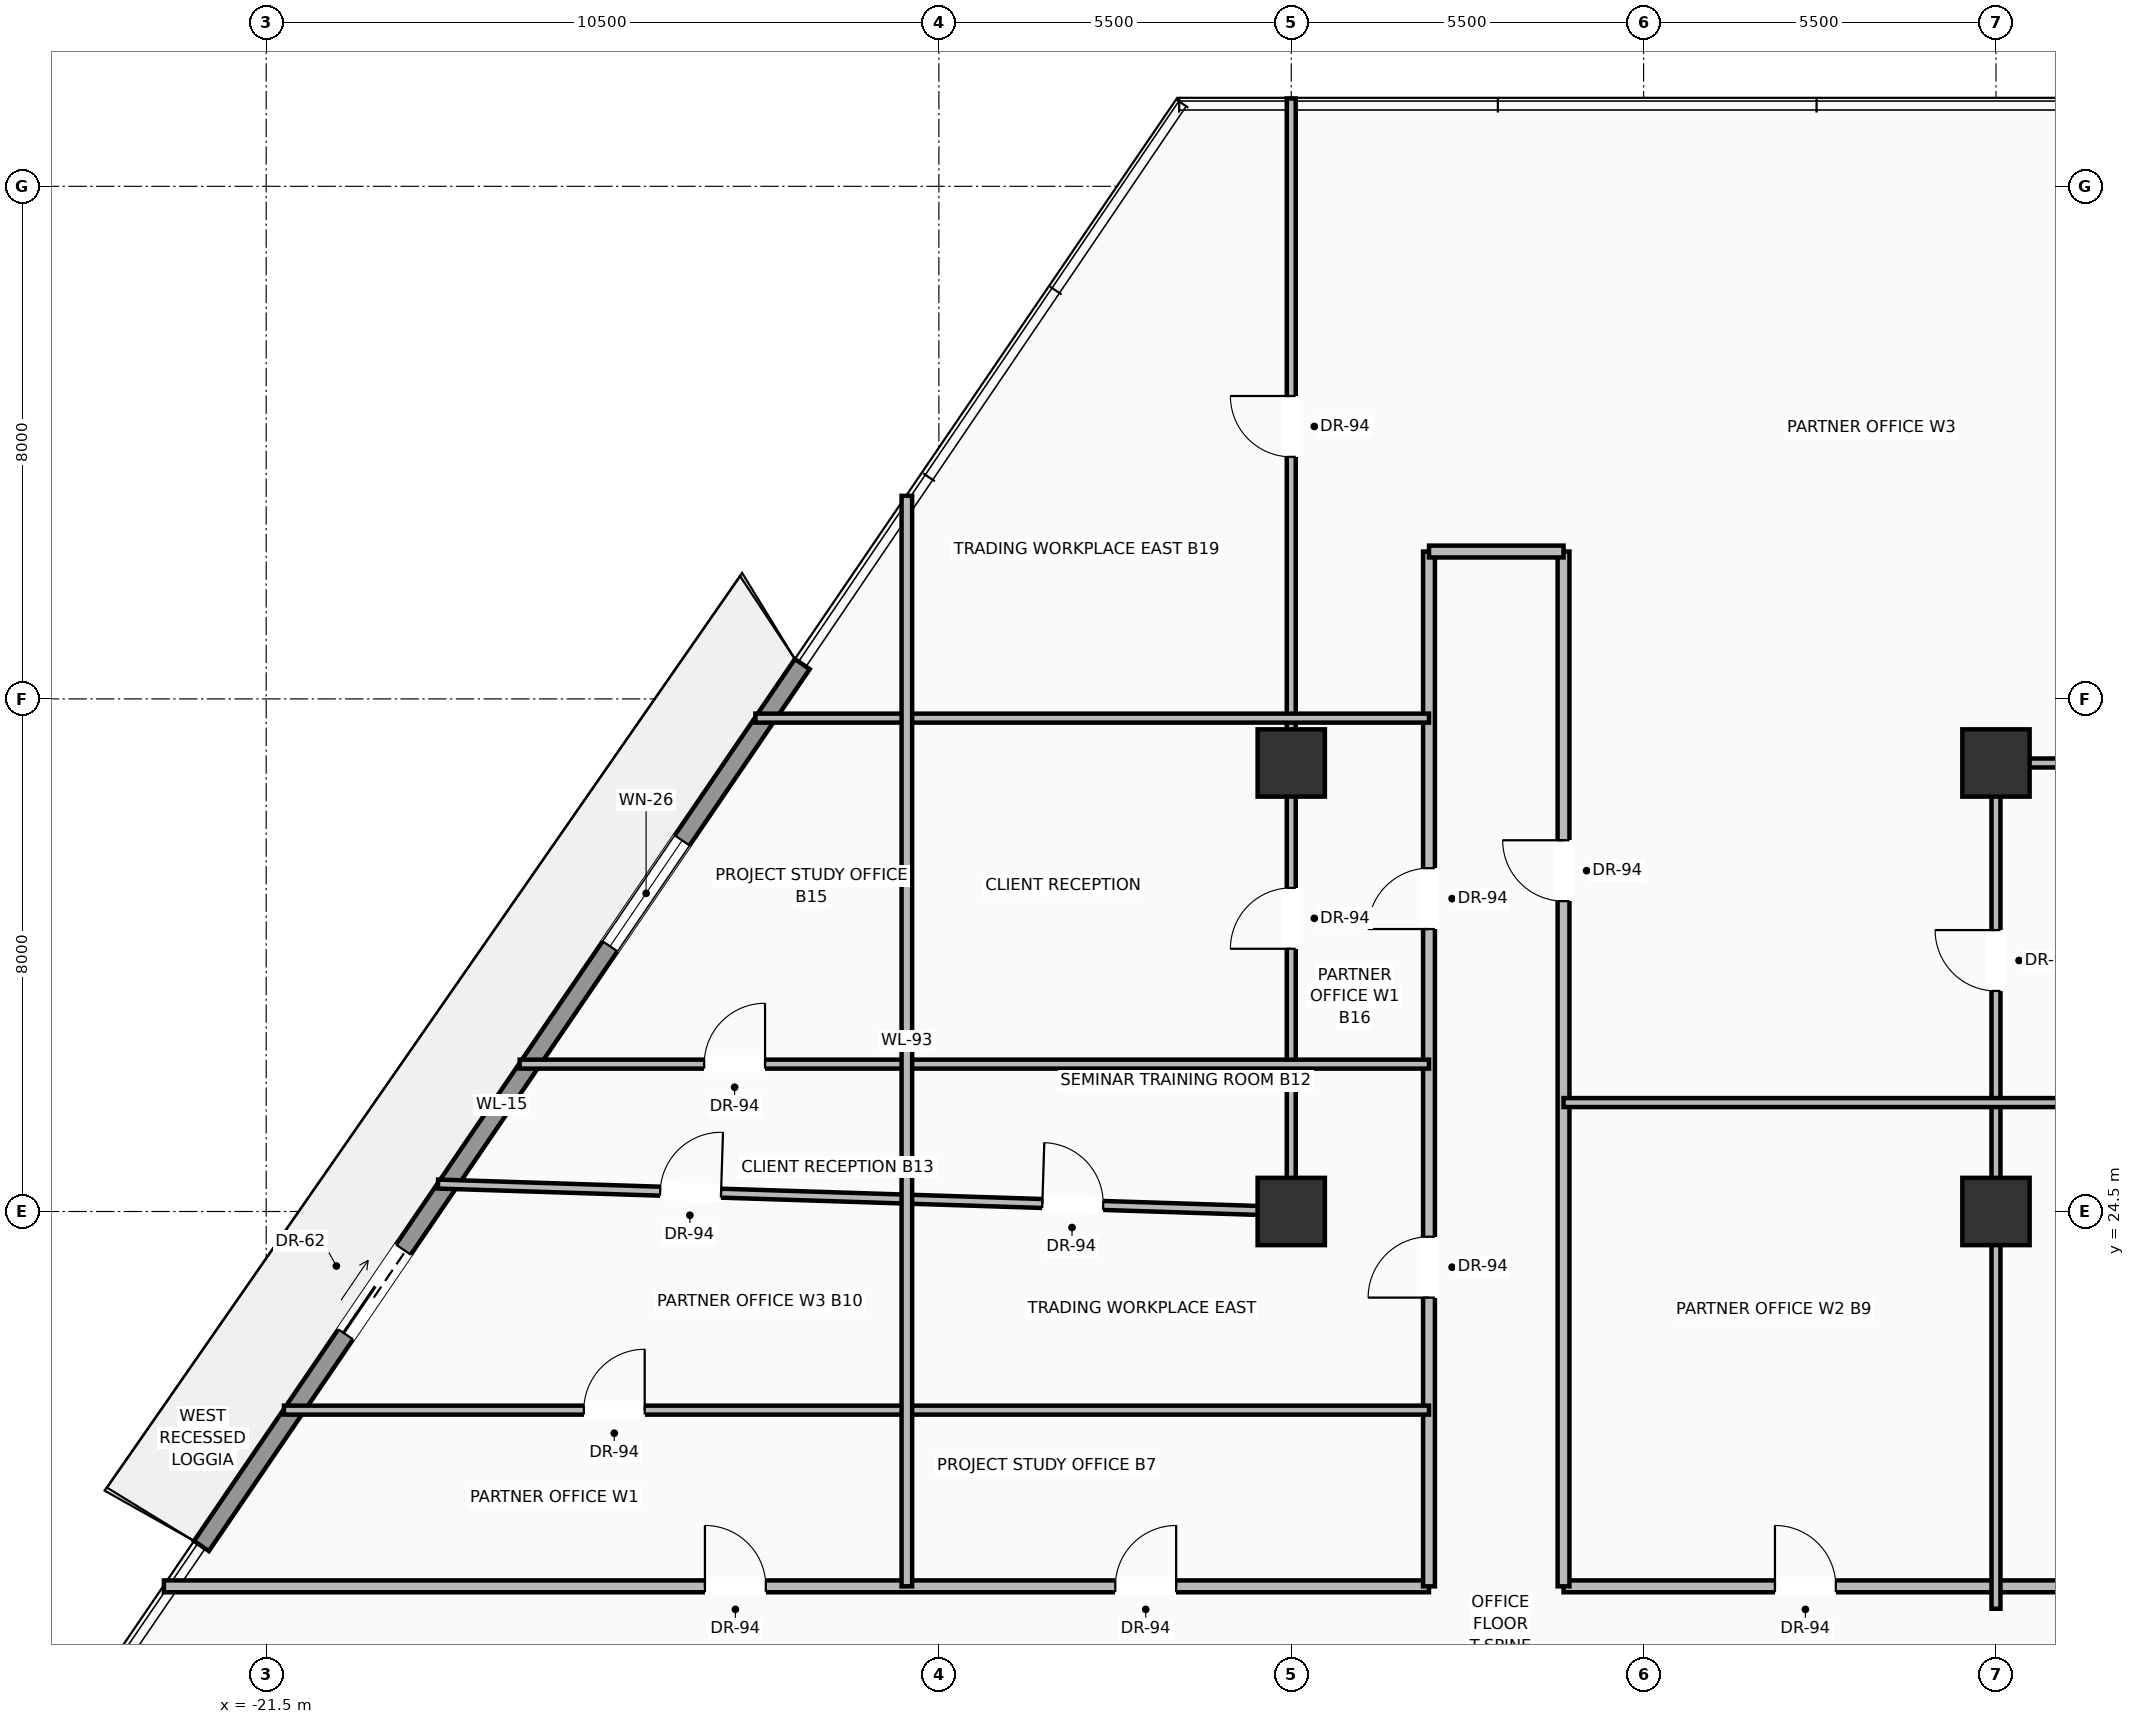
"""IFC4 building model, lengths in metres.
Left out: names, types, materials, properties, quantities, classifications, styles, units other than length and angle.
Written with IfcOpenShell. Run it as: python <this file> out.ifc"""

import sys

from ifc_helpers import new_model, si_unit, direction, frame, frame_2d, origin, origin_2d, place, context, subcontext, project, spatial, rectangle, extrude, source, transform, mapped, element, fill, save


model = new_model("IFC4")
c1 = context("Model", 3, precision=1e-05, world=origin(), true_north=direction((0.0, 1.0)))
c2 = subcontext(c1, "Body", "Model", "MODEL_VIEW")
j1 = project(units=[si_unit("LENGTHUNIT", "METRE"), si_unit("PLANEANGLEUNIT", "RADIAN")], contexts=[c1])
p1 = place(None, origin())
s1 = spatial("IfcSite", under=j1, at=p1, CompositionType="ELEMENT")
p2 = place(p1, origin())
s2 = spatial("IfcBuilding", under=s1, at=p2, CompositionType="ELEMENT")
p3 = place(p2, frame((0.0, 0.0, 46.0)))
s3 = spatial("IfcBuildingStorey", under=s2, at=p3, CompositionType="ELEMENT", Elevation=46.0)
m1 = source(origin(), c2, "Body", "SweptSolid", [
    extrude(rectangle(XDim=1.05, YDim=1.05, at=origin_2d()), origin(), (0.0, 0.0, 1.0), 3.7),
])
for number, where, z_axis, x_axis in (
    (1, (-5.5, 24.5, 0.0), (0.0, 0.0, 1.0), (1.0, 0.0, 0.0)),
    (2, (5.5, 24.5, 0.0), (0.0, 0.0, 1.0), (1.0, 0.0, 0.0)),
    (3, (-5.5, 31.5, 0.0), (0.0, 0.0, 1.0), (1.0, 0.0, 0.0)),
    (4, (5.5, 31.5, 0.0), (0.0, 0.0, 1.0), (1.0, 0.0, 0.0)),
):
    element("IfcColumn", number, at=place(p3, frame(where, z_axis=z_axis, x_axis=x_axis)), inside=s3, PredefinedType="COLUMN", context=c2, shape_type="MappedRepresentation", body=[
        mapped(m1, transform((0.0, 0.0, 0.0), scale=1.0)),
    ])
p4 = place(p3, frame((-22.51, 19.279, 0.0), z_axis=(0.0, 0.0, 1.0), x_axis=(0.563087999023, 0.826396941764, 0.0)))
e5 = element("IfcWall", 5, at=p4, inside=s3, PredefinedType="SOLIDWALL", context=c2, shape_type="SweptSolid", body=[
    extrude(rectangle(XDim=16.655, YDim=0.28, at=frame_2d((8.328, 0.0))), origin(), (0.0, 0.0, 1.0), 3.03),
])
p5 = place(p4, frame((3.997, 0.0, 0.0)))
e6 = element("IfcOpeningElement", 6, at=p5, cuts=e5, PredefinedType="OPENING", context=c2, shape_type="SweptSolid", body=[
    extrude(rectangle(XDim=1.6, YDim=2.35, at=frame_2d((0.8, 1.175))), frame((0.0, 0.15, 0.0), z_axis=(0.0, -1.0, 0.0), x_axis=(1.0, 0.0, 0.0)), (0.0, 0.0, 1.0), 0.3),
])
p6 = place(p4, frame((11.326, 0.0, 0.9)))
e7 = element("IfcOpeningElement", 7, at=p6, cuts=e5, PredefinedType="OPENING", context=c2, shape_type="SweptSolid", body=[
    extrude(rectangle(XDim=2.0, YDim=1.85, at=frame_2d((1.0, 0.925))), frame((0.0, 0.15, 0.0), z_axis=(0.0, -1.0, 0.0), x_axis=(1.0, 0.0, 0.0)), (0.0, 0.0, 1.0), 0.3),
])
p7 = place(p3, frame((-23.096, 18.65, 0.0), z_axis=(0.0, 0.0, 1.0), x_axis=(1.0, 0.0, 0.0)))
e8 = element("IfcWall", 8, at=p7, inside=s3, PredefinedType="PARTITIONING", context=c2, shape_type="SweptSolid", body=[
    extrude(rectangle(XDim=19.746, YDim=0.185, at=frame_2d((9.873, 0.0))), origin(), (0.0, 0.0, 1.0), 2.747),
])
p8 = place(p7, frame((8.445, 0.0, 0.0)))
e9 = element("IfcOpeningElement", 9, at=p8, cuts=e8, PredefinedType="OPENING", context=c2, shape_type="SweptSolid", body=[
    extrude(rectangle(XDim=0.95, YDim=2.2, at=frame_2d((0.475, 1.1))), frame((0.0, 0.103, 0.0), z_axis=(0.0, -1.0, 0.0), x_axis=(1.0, 0.0, 0.0)), (0.0, 0.0, 1.0), 0.205),
])
p9 = place(p7, frame((14.85, 0.0, 0.0)))
e10 = element("IfcOpeningElement", 10, at=p9, cuts=e8, PredefinedType="OPENING", context=c2, shape_type="SweptSolid", body=[
    extrude(rectangle(XDim=0.95, YDim=2.2, at=frame_2d((0.475, 1.1))), frame((0.0, 0.103, 0.0), z_axis=(0.0, -1.0, 0.0), x_axis=(1.0, 0.0, 0.0)), (0.0, 0.0, 1.0), 0.205),
])
p10 = place(p3, frame((-1.25, 18.65, 0.0), z_axis=(0.0, 0.0, 1.0), x_axis=(1.0, 0.0, 0.0)))
e11 = element("IfcWall", 11, at=p10, inside=s3, PredefinedType="PARTITIONING", context=c2, shape_type="SweptSolid", body=[
    extrude(rectangle(XDim=24.535, YDim=0.185, at=frame_2d((12.268, 0.0))), origin(), (0.0, 0.0, 1.0), 2.747),
])
p11 = place(p10, frame((12.986, 0.0, 0.0)))
e12 = element("IfcOpeningElement", 12, at=p11, cuts=e11, PredefinedType="OPENING", context=c2, shape_type="SweptSolid", body=[
    extrude(rectangle(XDim=0.95, YDim=2.2, at=frame_2d((0.475, 1.1))), frame((0.0, 0.103, 0.0), z_axis=(0.0, -1.0, 0.0), x_axis=(1.0, 0.0, 0.0)), (0.0, 0.0, 1.0), 0.205),
])
p12 = place(p10, frame((3.3, 0.0, 0.0)))
e13 = element("IfcOpeningElement", 13, at=p12, cuts=e11, PredefinedType="OPENING", context=c2, shape_type="SweptSolid", body=[
    extrude(rectangle(XDim=0.95, YDim=2.2, at=frame_2d((0.475, 1.1))), frame((0.0, 0.103, 0.0), z_axis=(0.0, -1.0, 0.0), x_axis=(1.0, 0.0, 0.0)), (0.0, 0.0, 1.0), 0.205),
])
p13 = place(p3, frame((-3.35, 18.65, 0.0), z_axis=(0.0, 0.0, 1.0), x_axis=(0.0, 1.0, 0.0)))
e14 = element("IfcWall", 14, at=p13, inside=s3, PredefinedType="PARTITIONING", context=c2, shape_type="SweptSolid", body=[
    extrude(rectangle(XDim=16.15, YDim=0.185, at=frame_2d((8.075, 0.0))), origin(), (0.0, 0.0, 1.0), 2.747),
])
p14 = place(p13, frame((4.506, 0.0, 0.0)))
e15 = element("IfcOpeningElement", 15, at=p14, cuts=e14, PredefinedType="OPENING", context=c2, shape_type="SweptSolid", body=[
    extrude(rectangle(XDim=0.95, YDim=2.2, at=frame_2d((0.475, 1.1))), frame((0.0, 0.103, 0.0), z_axis=(0.0, -1.0, 0.0), x_axis=(1.0, 0.0, 0.0)), (0.0, 0.0, 1.0), 0.205),
])
p15 = place(p13, frame((10.258, 0.0, 0.0)))
e16 = element("IfcOpeningElement", 16, at=p15, cuts=e14, PredefinedType="OPENING", context=c2, shape_type="SweptSolid", body=[
    extrude(rectangle(XDim=0.95, YDim=2.2, at=frame_2d((0.475, 1.1))), frame((0.0, 0.103, 0.0), z_axis=(0.0, -1.0, 0.0), x_axis=(1.0, 0.0, 0.0)), (0.0, 0.0, 1.0), 0.205),
])
p16 = place(p3, frame((-1.25, 18.65, 0.0), z_axis=(0.0, 0.0, 1.0), x_axis=(0.0, 1.0, 0.0)))
e17 = element("IfcWall", 17, at=p16, inside=s3, PredefinedType="PARTITIONING", context=c2, shape_type="SweptSolid", body=[
    extrude(rectangle(XDim=16.15, YDim=0.185, at=frame_2d((8.075, 0.0))), origin(), (0.0, 0.0, 1.0), 2.747),
])
p17 = place(p16, frame((10.694, 0.0, 0.0)))
e18 = element("IfcOpeningElement", 18, at=p17, cuts=e17, PredefinedType="OPENING", context=c2, shape_type="SweptSolid", body=[
    extrude(rectangle(XDim=0.95, YDim=2.2, at=frame_2d((0.475, 1.1))), frame((0.0, 0.103, 0.0), z_axis=(0.0, -1.0, 0.0), x_axis=(1.0, 0.0, 0.0)), (0.0, 0.0, 1.0), 0.205),
])
p18 = place(p3, frame((-3.35, 34.8, 0.0), z_axis=(0.0, 0.0, 1.0), x_axis=(1.0, 0.0, 0.0)))
e19 = element("IfcWall", 19, at=p18, inside=s3, PredefinedType="PARTITIONING", context=c2, shape_type="SweptSolid", body=[
    extrude(rectangle(XDim=2.1, YDim=0.185, at=frame_2d((1.05, 0.0))), origin(), (0.0, 0.0, 1.0), 2.979),
])
p19 = place(p3, frame((-5.5, 24.5, 0.0), z_axis=(0.0, 0.0, 1.0), x_axis=(0.0, 1.0, 0.0)))
e20 = element("IfcWall", 20, at=p19, inside=s3, PredefinedType="PARTITIONING", context=c2, shape_type="SweptSolid", body=[
    extrude(rectangle(XDim=17.371, YDim=0.14, at=frame_2d((8.686, 0.0))), origin(), (0.0, 0.0, 1.0), 2.747),
])
p20 = place(p19, frame((11.777, 0.0, 0.0)))
e21 = element("IfcOpeningElement", 21, at=p20, cuts=e20, PredefinedType="OPENING", context=c2, shape_type="SweptSolid", body=[
    extrude(rectangle(XDim=0.95, YDim=2.2, at=frame_2d((0.475, 1.1))), frame((0.0, 0.08, 0.0), z_axis=(0.0, -1.0, 0.0), x_axis=(1.0, 0.0, 0.0)), (0.0, 0.0, 1.0), 0.16),
])
p21 = place(p19, frame((4.1, 0.0, 0.0)))
e22 = element("IfcOpeningElement", 22, at=p21, cuts=e20, PredefinedType="OPENING", context=c2, shape_type="SweptSolid", body=[
    extrude(rectangle(XDim=0.95, YDim=2.2, at=frame_2d((0.475, 1.1))), frame((0.0, 0.08, 0.0), z_axis=(0.0, -1.0, 0.0), x_axis=(1.0, 0.0, 0.0)), (0.0, 0.0, 1.0), 0.16),
])
p22 = place(p3, frame((5.5, 18.3, 0.0), z_axis=(0.0, 0.0, 1.0), x_axis=(0.0, 1.0, 0.0)))
e23 = element("IfcWall", 23, at=p22, inside=s3, PredefinedType="PARTITIONING", context=c2, shape_type="SweptSolid", body=[
    extrude(rectangle(XDim=13.2, YDim=0.14, at=frame_2d((6.6, 0.0))), origin(), (0.0, 0.0, 1.0), 2.747),
])
p23 = place(p22, frame((9.642, 0.0, 0.0)))
e24 = element("IfcOpeningElement", 24, at=p23, cuts=e23, PredefinedType="OPENING", context=c2, shape_type="SweptSolid", body=[
    extrude(rectangle(XDim=0.95, YDim=2.2, at=frame_2d((0.475, 1.1))), frame((0.0, 0.08, 0.0), z_axis=(0.0, -1.0, 0.0), x_axis=(1.0, 0.0, 0.0)), (0.0, 0.0, 1.0), 0.16),
])
p24 = place(p3, frame((-18.819, 24.928, 0.0), z_axis=(0.0, 0.0, 1.0), x_axis=(0.999482929185, -0.032153915288, 0.0)))
e25 = element("IfcWall", 25, at=p24, inside=s3, PredefinedType="PARTITIONING", context=c2, shape_type="SweptSolid", body=[
    extrude(rectangle(XDim=13.325, YDim=0.14, at=frame_2d((6.663, 0.0))), origin(), (0.0, 0.0, 1.0), 2.747),
])
p25 = place(p24, frame((9.438, 0.0, 0.0)))
e26 = element("IfcOpeningElement", 26, at=p25, cuts=e25, PredefinedType="OPENING", context=c2, shape_type="SweptSolid", body=[
    extrude(rectangle(XDim=0.95, YDim=2.2, at=frame_2d((0.475, 1.1))), frame((0.0, 0.08, 0.0), z_axis=(0.0, -1.0, 0.0), x_axis=(1.0, 0.0, 0.0)), (0.0, 0.0, 1.0), 0.16),
])
p26 = place(p24, frame((3.471, 0.0, 0.0)))
e27 = element("IfcOpeningElement", 27, at=p26, cuts=e25, PredefinedType="OPENING", context=c2, shape_type="SweptSolid", body=[
    extrude(rectangle(XDim=0.95, YDim=2.2, at=frame_2d((0.475, 1.1))), frame((0.0, 0.08, 0.0), z_axis=(0.0, -1.0, 0.0), x_axis=(1.0, 0.0, 0.0)), (0.0, 0.0, 1.0), 0.16),
])
p27 = place(p3, frame((5.5, 31.5, 0.0), z_axis=(0.0, 0.0, 1.0), x_axis=(1.0, 0.0, 0.0)))
e28 = element("IfcWall", 28, at=p27, inside=s3, PredefinedType="PARTITIONING", context=c2, shape_type="SweptSolid", body=[
    extrude(rectangle(XDim=9.16, YDim=0.14, at=frame_2d((4.58, 0.0))), origin(), (0.0, 0.0, 1.0), 2.747),
])
p28 = place(p3, frame((-21.223, 21.4, 0.0), z_axis=(0.0, 0.0, 1.0), x_axis=(1.0, 0.0, 0.0)))
e29 = element("IfcWall", 29, at=p28, inside=s3, PredefinedType="PARTITIONING", context=c2, shape_type="SweptSolid", body=[
    extrude(rectangle(XDim=17.873, YDim=0.14, at=frame_2d((8.936, 0.0))), origin(), (0.0, 0.0, 1.0), 2.747),
])
p29 = place(p28, frame((4.681, 0.0, 0.0)))
e30 = element("IfcOpeningElement", 30, at=p29, cuts=e29, PredefinedType="OPENING", context=c2, shape_type="SweptSolid", body=[
    extrude(rectangle(XDim=0.95, YDim=2.2, at=frame_2d((0.475, 1.1))), frame((0.0, 0.08, 0.0), z_axis=(0.0, -1.0, 0.0), x_axis=(1.0, 0.0, 0.0)), (0.0, 0.0, 1.0), 0.16),
])
p30 = place(p3, frame((-17.543, 26.8, 0.0), z_axis=(0.0, 0.0, 1.0), x_axis=(1.0, 0.0, 0.0)))
e31 = element("IfcWall", 31, at=p30, inside=s3, PredefinedType="PARTITIONING", context=c2, shape_type="SweptSolid", body=[
    extrude(rectangle(XDim=14.193, YDim=0.14, at=frame_2d((7.097, 0.0))), origin(), (0.0, 0.0, 1.0), 2.747),
])
p31 = place(p30, frame((2.88, 0.0, 0.0)))
e32 = element("IfcOpeningElement", 32, at=p31, cuts=e31, PredefinedType="OPENING", context=c2, shape_type="SweptSolid", body=[
    extrude(rectangle(XDim=0.95, YDim=2.2, at=frame_2d((0.475, 1.1))), frame((0.0, 0.08, 0.0), z_axis=(0.0, -1.0, 0.0), x_axis=(1.0, 0.0, 0.0)), (0.0, 0.0, 1.0), 0.16),
])
p32 = place(p3, frame((-13.864, 32.2, 0.0), z_axis=(0.0, 0.0, 1.0), x_axis=(1.0, 0.0, 0.0)))
e33 = element("IfcWall", 33, at=p32, inside=s3, PredefinedType="PARTITIONING", context=c2, shape_type="SweptSolid", body=[
    extrude(rectangle(XDim=10.514, YDim=0.14, at=frame_2d((5.257, 0.0))), origin(), (0.0, 0.0, 1.0), 2.747),
])
p33 = place(p3, frame((-1.25, 26.2, 0.0), z_axis=(0.0, 0.0, 1.0), x_axis=(1.0, 0.0, 0.0)))
e34 = element("IfcWall", 34, at=p33, inside=s3, PredefinedType="PARTITIONING", context=c2, shape_type="SweptSolid", body=[
    extrude(rectangle(XDim=19.468, YDim=0.14, at=frame_2d((9.734, 0.0))), origin(), (0.0, 0.0, 1.0), 2.747),
])
p34 = place(p3, frame((-11.5, 18.65, 0.0), z_axis=(0.0, 0.0, 1.0), x_axis=(0.0, 1.0, 0.0)))
e35 = element("IfcWall", 35, at=p34, inside=s3, PredefinedType="PARTITIONING", context=c2, shape_type="SweptSolid", body=[
    extrude(rectangle(XDim=17.02, YDim=0.165, at=frame_2d((8.51, 0.0))), origin(), (0.0, 0.0, 1.0), 2.747),
])
m2 = source(origin(), c2, "Body", "SweptSolid", [
    extrude(rectangle(XDim=1.6, YDim=2.35, at=frame_2d((0.8, 1.175))), frame((0.0, 0.025, 0.0), z_axis=(0.0, -1.0, 0.0), x_axis=(1.0, 0.0, 0.0)), (0.0, 0.0, 1.0), 0.05),
])
p35 = place(p5, origin())
e36 = element("IfcDoor", 36, at=p35, inside=s3, OperationType="SLIDING_TO_LEFT", PredefinedType="DOOR", context=c2, shape_type="MappedRepresentation", body=[
    mapped(m2, transform((0.0, 0.0, 0.0), scale=1.0)),
])
fill(e6, e36)
m3 = source(origin(), c2, "Body", "SweptSolid", [
    extrude(rectangle(XDim=2.0, YDim=1.85, at=frame_2d((1.0, 0.925))), frame((0.0, 0.03, 0.0), z_axis=(0.0, -1.0, 0.0), x_axis=(1.0, 0.0, 0.0)), (0.0, 0.0, 1.0), 0.06),
])
p36 = place(p6, origin())
e37 = element("IfcWindow", 37, at=p36, inside=s3, PartitioningType="SINGLE_PANEL", PredefinedType="WINDOW", context=c2, shape_type="MappedRepresentation", body=[
    mapped(m3, transform((0.0, 0.0, 0.0), scale=1.0)),
])
fill(e7, e37)
m4 = source(origin(), c2, "Body", "SweptSolid", [
    extrude(rectangle(XDim=0.95, YDim=2.2, at=frame_2d((0.475, 1.1))), frame((0.0, 0.025, 0.0), z_axis=(0.0, -1.0, 0.0), x_axis=(1.0, 0.0, 0.0)), (0.0, 0.0, 1.0), 0.05),
])
p37 = place(p8, origin())
e38 = element("IfcDoor", 38, at=p37, inside=s3, OperationType="SINGLE_SWING_LEFT", PredefinedType="DOOR", context=c2, shape_type="MappedRepresentation", body=[
    mapped(m4, transform((0.0, 0.0, 0.0), scale=1.0)),
])
fill(e9, e38)
p38 = place(p14, origin())
e39 = element("IfcDoor", 39, at=p38, inside=s3, OperationType="SINGLE_SWING_LEFT", PredefinedType="DOOR", context=c2, shape_type="MappedRepresentation", body=[
    mapped(m4, transform((0.0, 0.0, 0.0), scale=1.0)),
])
fill(e15, e39)
p39 = place(p17, origin())
e40 = element("IfcDoor", 40, at=p39, inside=s3, OperationType="SINGLE_SWING_RIGHT", PredefinedType="DOOR", context=c2, shape_type="MappedRepresentation", body=[
    mapped(m4, transform((0.0, 0.0, 0.0), scale=1.0)),
])
fill(e18, e40)
p40 = place(p9, origin())
e41 = element("IfcDoor", 41, at=p40, inside=s3, OperationType="SINGLE_SWING_RIGHT", PredefinedType="DOOR", context=c2, shape_type="MappedRepresentation", body=[
    mapped(m4, transform((0.0, 0.0, 0.0), scale=1.0)),
])
fill(e10, e41)
p41 = place(p12, origin())
e42 = element("IfcDoor", 42, at=p41, inside=s3, OperationType="SINGLE_SWING_LEFT", PredefinedType="DOOR", context=c2, shape_type="MappedRepresentation", body=[
    mapped(m4, transform((0.0, 0.0, 0.0), scale=1.0)),
])
fill(e13, e42)
p42 = place(p29, origin())
e43 = element("IfcDoor", 43, at=p42, inside=s3, OperationType="SINGLE_SWING_RIGHT", PredefinedType="DOOR", context=c2, shape_type="MappedRepresentation", body=[
    mapped(m4, transform((0.0, 0.0, 0.0), scale=1.0)),
])
fill(e30, e43)
p43 = place(p25, origin())
e44 = element("IfcDoor", 44, at=p43, inside=s3, OperationType="SINGLE_SWING_LEFT", PredefinedType="DOOR", context=c2, shape_type="MappedRepresentation", body=[
    mapped(m4, transform((0.0, 0.0, 0.0), scale=1.0)),
])
fill(e26, e44)
p44 = place(p23, origin())
e45 = element("IfcDoor", 45, at=p44, inside=s3, OperationType="SINGLE_SWING_RIGHT", PredefinedType="DOOR", context=c2, shape_type="MappedRepresentation", body=[
    mapped(m4, transform((0.0, 0.0, 0.0), scale=1.0)),
])
fill(e24, e45)
p45 = place(p15, origin())
e46 = element("IfcDoor", 46, at=p45, inside=s3, OperationType="SINGLE_SWING_LEFT", PredefinedType="DOOR", context=c2, shape_type="MappedRepresentation", body=[
    mapped(m4, transform((0.0, 0.0, 0.0), scale=1.0)),
])
fill(e16, e46)
p46 = place(p20, origin())
e47 = element("IfcDoor", 47, at=p46, inside=s3, OperationType="SINGLE_SWING_RIGHT", PredefinedType="DOOR", context=c2, shape_type="MappedRepresentation", body=[
    mapped(m4, transform((0.0, 0.0, 0.0), scale=1.0)),
])
fill(e21, e47)
p47 = place(p26, origin())
e48 = element("IfcDoor", 48, at=p47, inside=s3, OperationType="SINGLE_SWING_RIGHT", PredefinedType="DOOR", context=c2, shape_type="MappedRepresentation", body=[
    mapped(m4, transform((0.0, 0.0, 0.0), scale=1.0)),
])
fill(e27, e48)
p48 = place(p21, origin())
e49 = element("IfcDoor", 49, at=p48, inside=s3, OperationType="SINGLE_SWING_LEFT", PredefinedType="DOOR", context=c2, shape_type="MappedRepresentation", body=[
    mapped(m4, transform((0.0, 0.0, 0.0), scale=1.0)),
])
fill(e22, e49)
p49 = place(p31, origin())
e50 = element("IfcDoor", 50, at=p49, inside=s3, OperationType="SINGLE_SWING_RIGHT", PredefinedType="DOOR", context=c2, shape_type="MappedRepresentation", body=[
    mapped(m4, transform((0.0, 0.0, 0.0), scale=1.0)),
])
fill(e32, e50)
save(model, sys.argv[1])
